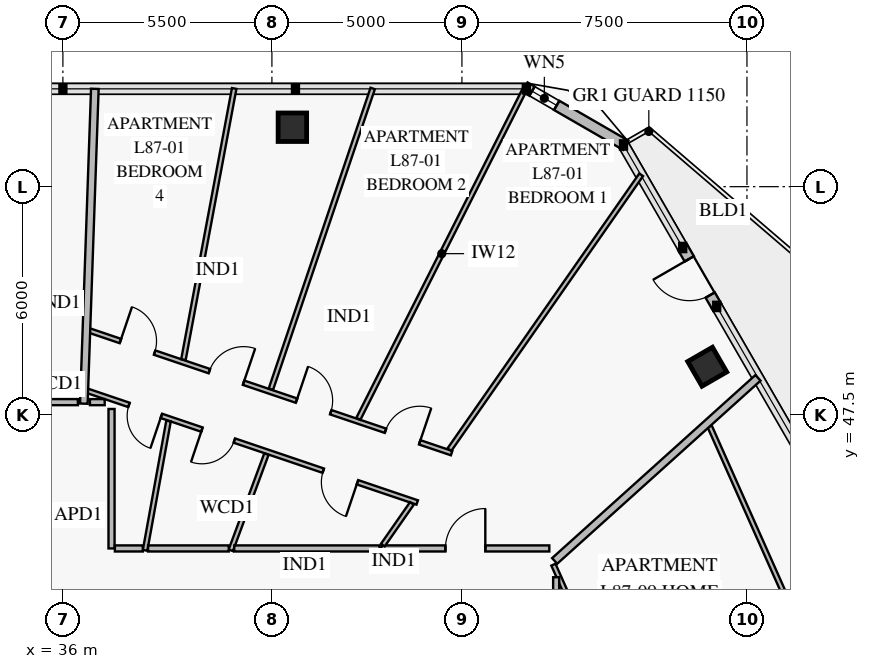
"""IFC4 building model, lengths in metres.
Left out: names, types, materials, properties, quantities, classifications, styles, units other than length and angle.
Written with IfcOpenShell. Run it as: python <this file> out.ifc"""

import sys

from ifc_helpers import new_model, si_unit, direction, frame, frame_2d, origin, origin_2d, place, context, subcontext, project, spatial, rectangle, extrude, element, fill, save


model = new_model("IFC4")
c1 = context("Model", 3, precision=1e-05, world=origin(), true_north=direction((0.0, 1.0)))
c2 = subcontext(c1, "Body", "Model", "MODEL_VIEW")
j1 = project(units=[si_unit("LENGTHUNIT", "METRE"), si_unit("PLANEANGLEUNIT", "RADIAN")], contexts=[c1])
p1 = place(None, origin())
s1 = spatial("IfcSite", under=j1, at=p1, CompositionType="ELEMENT")
p2 = place(p1, origin())
s2 = spatial("IfcBuilding", under=s1, at=p2, CompositionType="ELEMENT")
p3 = place(p2, frame((0.0, 0.0, 342.4)))
s3 = spatial("IfcBuildingStorey", under=s2, at=p3, CompositionType="ELEMENT", Elevation=342.4)
for number, where, z_axis, x_axis in (
    (1, (52.955, 48.762, 0.0), (0.0, 0.0, 1.0), (-0.5, 0.866, 0.0)),
    (2, (42.039, 55.064, 0.0), (0.0, 0.0, 1.0), (-1.0, 0.0, 0.0)),
):
    element("IfcColumn", number, at=place(p3, frame(where, z_axis=z_axis, x_axis=x_axis)), inside=s3, PredefinedType="COLUMN", context=c2, shape_type="SweptSolid", body=[
        extrude(rectangle(XDim=0.75, YDim=0.75, at=origin_2d()), origin(), (0.0, 0.0, 1.0), 3.55),
    ])
p4 = place(p3, frame((48.157, 56.122, 0.0), z_axis=(0.0, 0.0, 1.0), x_axis=(0.866023752521, -0.50000286006, 0.0)))
e3 = element("IfcWall", 3, at=p4, inside=s3, PredefinedType="SOLIDWALL", context=c2, shape_type="SweptSolid", body=[
    extrude(rectangle(XDim=3.065, YDim=0.28, at=frame_2d((1.532, 0.0))), origin(), (0.0, 0.0, 1.0), 3.55),
])
p5 = place(p4, frame((0.216, 0.0, 0.85)))
e4 = element("IfcOpeningElement", 4, at=p5, cuts=e3, PredefinedType="OPENING", context=c2, shape_type="SweptSolid", body=[
    extrude(rectangle(XDim=0.75, YDim=1.5, at=frame_2d((0.375, 0.75))), frame((0.0, 0.152, 0.0), z_axis=(0.0, -1.0, 0.0), x_axis=(1.0, 0.0, 0.0)), (0.0, 0.0, 1.0), 0.304),
])
p6 = place(p3, frame((52.31, 51.899, 0.0), z_axis=(0.0, 0.0, 1.0), x_axis=(0.500041240653, -0.866001592173, 0.0)))
e5 = element("IfcWall", 5, at=p6, inside=s3, PredefinedType="SOLIDWALL", context=c2, shape_type="SweptSolid", body=[
    extrude(rectangle(XDim=1.79, YDim=0.28, at=frame_2d((0.895, 0.0))), origin(), (0.0, 0.0, 1.0), 3.55),
])
p7 = place(p6, frame((0.345, 0.0, 0.0)))
e6 = element("IfcOpeningElement", 6, at=p7, cuts=e5, PredefinedType="OPENING", context=c2, shape_type="SweptSolid", body=[
    extrude(rectangle(XDim=1.1, YDim=2.2, at=frame_2d((0.55, 1.1))), frame((0.0, 0.152, 0.0), z_axis=(0.0, -1.0, 0.0), x_axis=(1.0, 0.0, 0.0)), (0.0, 0.0, 1.0), 0.304),
])
p8 = place(p3, frame((45.323, 45.19, 0.0), z_axis=(0.0, 0.0, 1.0), x_axis=(-0.947209030083, 0.320616676625, 0.0)))
e7 = element("IfcWall", 7, at=p8, inside=s3, PredefinedType="PARTITIONING", context=c2, shape_type="SweptSolid", body=[
    extrude(rectangle(XDim=9.205, YDim=0.12, at=frame_2d((4.602, 0.0))), origin(), (0.0, 0.0, 1.0), 3.0),
])
p9 = place(p8, frame((1.659, 0.0, 0.0)))
e8 = element("IfcOpeningElement", 8, at=p9, cuts=e7, PredefinedType="OPENING", context=c2, shape_type="SweptSolid", body=[
    extrude(rectangle(XDim=0.95, YDim=2.1, at=frame_2d((0.475, 1.05))), frame((0.0, 0.072, 0.0), z_axis=(0.0, -1.0, 0.0), x_axis=(1.0, 0.0, 0.0)), (0.0, 0.0, 1.0), 0.144),
])
p10 = place(p8, frame((5.08, 0.0, 0.0)))
e9 = element("IfcOpeningElement", 9, at=p10, cuts=e7, PredefinedType="OPENING", context=c2, shape_type="SweptSolid", body=[
    extrude(rectangle(XDim=0.9, YDim=2.1, at=frame_2d((0.45, 1.05))), frame((0.0, 0.072, 0.0), z_axis=(0.0, -1.0, 0.0), x_axis=(1.0, 0.0, 0.0)), (0.0, 0.0, 1.0), 0.144),
])
p11 = place(p8, frame((7.107, 0.0, 0.0)))
e10 = element("IfcOpeningElement", 10, at=p11, cuts=e7, PredefinedType="OPENING", context=c2, shape_type="SweptSolid", body=[
    extrude(rectangle(XDim=0.9, YDim=2.1, at=frame_2d((0.45, 1.05))), frame((0.0, 0.072, 0.0), z_axis=(0.0, -1.0, 0.0), x_axis=(1.0, 0.0, 0.0)), (0.0, 0.0, 1.0), 0.144),
])
p12 = place(p3, frame((46.229, 46.488, 0.0), z_axis=(0.0, 0.0, 1.0), x_axis=(-0.947206471438, 0.320624235618, 0.0)))
e11 = element("IfcWall", 11, at=p12, inside=s3, PredefinedType="PARTITIONING", context=c2, shape_type="SweptSolid", body=[
    extrude(rectangle(XDim=10.088, YDim=0.12, at=frame_2d((5.044, 0.0))), origin(), (0.0, 0.0, 1.0), 3.0),
])
p13 = place(p12, frame((0.887, 0.0, 0.0)))
e12 = element("IfcOpeningElement", 12, at=p13, cuts=e11, PredefinedType="OPENING", context=c2, shape_type="SweptSolid", body=[
    extrude(rectangle(XDim=0.95, YDim=2.1, at=frame_2d((0.475, 1.05))), frame((0.0, 0.072, 0.0), z_axis=(0.0, -1.0, 0.0), x_axis=(1.0, 0.0, 0.0)), (0.0, 0.0, 1.0), 0.144),
])
p14 = place(p12, frame((3.358, 0.0, 0.0)))
e13 = element("IfcOpeningElement", 13, at=p14, cuts=e11, PredefinedType="OPENING", context=c2, shape_type="SweptSolid", body=[
    extrude(rectangle(XDim=0.95, YDim=2.1, at=frame_2d((0.475, 1.05))), frame((0.0, 0.072, 0.0), z_axis=(0.0, -1.0, 0.0), x_axis=(1.0, 0.0, 0.0)), (0.0, 0.0, 1.0), 0.144),
])
p15 = place(p12, frame((5.779, 0.0, 0.0)))
e14 = element("IfcOpeningElement", 14, at=p15, cuts=e11, PredefinedType="OPENING", context=c2, shape_type="SweptSolid", body=[
    extrude(rectangle(XDim=0.95, YDim=2.1, at=frame_2d((0.475, 1.05))), frame((0.0, 0.072, 0.0), z_axis=(0.0, -1.0, 0.0), x_axis=(1.0, 0.0, 0.0)), (0.0, 0.0, 1.0), 0.144),
])
p16 = place(p12, frame((8.251, 0.0, 0.0)))
e15 = element("IfcOpeningElement", 15, at=p16, cuts=e11, PredefinedType="OPENING", context=c2, shape_type="SweptSolid", body=[
    extrude(rectangle(XDim=0.95, YDim=2.1, at=frame_2d((0.475, 1.05))), frame((0.0, 0.072, 0.0), z_axis=(0.0, -1.0, 0.0), x_axis=(1.0, 0.0, 0.0)), (0.0, 0.0, 1.0), 0.144),
])
p17 = place(p3, frame((48.799, 43.98, 0.0), z_axis=(0.0, 0.0, 1.0), x_axis=(-1.0, 0.0, 0.0)))
e16 = element("IfcWall", 16, at=p17, inside=s3, PredefinedType="PARTITIONING", context=c2, shape_type="SweptSolid", body=[
    extrude(rectangle(XDim=4.418, YDim=0.16, at=frame_2d((2.209, 0.0))), origin(), (0.0, 0.0, 1.0), 3.0),
])
p18 = place(p17, frame((1.684, 0.0, 0.0)))
e17 = element("IfcOpeningElement", 17, at=p18, cuts=e16, PredefinedType="OPENING", context=c2, shape_type="SweptSolid", body=[
    extrude(rectangle(XDim=1.05, YDim=2.15, at=frame_2d((0.525, 1.075))), frame((0.0, 0.092, 0.0), z_axis=(0.0, -1.0, 0.0), x_axis=(1.0, 0.0, 0.0)), (0.0, 0.0, 1.0), 0.184),
])
p19 = place(p3, frame((56.469, 39.442, 0.0), z_axis=(0.0, 0.0, 1.0), x_axis=(-0.406736554193, 0.913545497216, 0.0)))
e18 = element("IfcWall", 18, at=p19, inside=s3, PredefinedType="PARTITIONING", context=c2, shape_type="SweptSolid", body=[
    extrude(rectangle(XDim=8.483, YDim=0.12, at=frame_2d((4.241, 0.0))), origin(), (0.0, 0.0, 1.0), 3.55),
])
p20 = place(p19, frame((2.362, 0.0, 0.0)))
e19 = element("IfcOpeningElement", 19, at=p20, cuts=e18, PredefinedType="OPENING", context=c2, shape_type="SweptSolid", body=[
    extrude(rectangle(XDim=0.95, YDim=2.1, at=frame_2d((0.475, 1.05))), frame((0.0, 0.072, 0.0), z_axis=(0.0, -1.0, 0.0), x_axis=(1.0, 0.0, 0.0)), (0.0, 0.0, 1.0), 0.144),
])
p21 = place(p3, frame((48.94, 43.651, 0.0), z_axis=(0.0, 0.0, 1.0), x_axis=(0.74315080538, 0.669123964944, 0.0)))
e20 = element("IfcWall", 20, at=p21, inside=s3, PredefinedType="PARTITIONING", context=c2, shape_type="SweptSolid", body=[
    extrude(rectangle(XDim=7.199, YDim=0.2, at=frame_2d((3.6, 0.0))), origin(), (0.0, 0.0, 1.0), 2.97),
])
p22 = place(p3, frame((40.418, 43.93, 0.0), z_axis=(0.0, 0.0, 1.0), x_axis=(0.347234815936, 0.937778216105, 0.0)))
e21 = element("IfcWall", 21, at=p22, inside=s3, PredefinedType="PARTITIONING", context=c2, shape_type="SweptSolid", body=[
    extrude(rectangle(XDim=2.699, YDim=0.12, at=frame_2d((1.35, 0.0))), origin(), (0.0, 0.0, 1.0), 3.55),
])
p23 = place(p3, frame((38.163, 43.93, 0.0), z_axis=(0.0, 0.0, 1.0), x_axis=(0.178394636556, 0.983959020309, 0.0)))
e22 = element("IfcWall", 22, at=p23, inside=s3, PredefinedType="PARTITIONING", context=c2, shape_type="SweptSolid", body=[
    extrude(rectangle(XDim=3.458, YDim=0.12, at=frame_2d((1.729, 0.0))), origin(), (0.0, 0.0, 1.0), 3.55),
])
p24 = place(p3, frame((43.774, 47.39, 0.0), z_axis=(0.0, 0.0, 1.0), x_axis=(0.450869548037, 0.892589855787, 0.0)))
e23 = element("IfcWall", 23, at=p24, inside=s3, PredefinedType="PARTITIONING", context=c2, shape_type="SweptSolid", body=[
    extrude(rectangle(XDim=9.74, YDim=0.12, at=frame_2d((4.87, 0.0))), origin(), (0.0, 0.0, 1.0), 2.97),
])
p25 = place(p3, frame((41.473, 48.169, 0.0), z_axis=(0.0, 0.0, 1.0), x_axis=(0.32064215142, 0.947200406848, 0.0)))
e24 = element("IfcWall", 24, at=p25, inside=s3, PredefinedType="PARTITIONING", context=c2, shape_type="SweptSolid", body=[
    extrude(rectangle(XDim=8.356, YDim=0.12, at=frame_2d((4.178, 0.0))), origin(), (0.0, 0.0, 1.0), 2.97),
])
p26 = place(p3, frame((39.172, 48.948, 0.0), z_axis=(0.0, 0.0, 1.0), x_axis=(0.183929112918, 0.982939510561, 0.0)))
e25 = element("IfcWall", 25, at=p26, inside=s3, PredefinedType="PARTITIONING", context=c2, shape_type="SweptSolid", body=[
    extrude(rectangle(XDim=7.259, YDim=0.12, at=frame_2d((3.63, 0.0))), origin(), (0.0, 0.0, 1.0), 2.97),
])
p27 = place(p3, frame((44.419, 44.068, 0.0), z_axis=(0.0, 0.0, 1.0), x_axis=(0.572224421866, 0.820097074144, 0.0)))
e26 = element("IfcWall", 26, at=p27, inside=s3, PredefinedType="PARTITIONING", context=c2, shape_type="SweptSolid", body=[
    extrude(rectangle(XDim=1.338, YDim=0.12, at=frame_2d((0.669, 0.0))), origin(), (0.0, 0.0, 1.0), 3.55),
])
p28 = place(p3, frame((46.171, 46.579, 0.0), z_axis=(0.0, 0.0, 1.0), x_axis=(0.572144356321, 0.820152934233, 0.0)))
e27 = element("IfcWall", 27, at=p28, inside=s3, PredefinedType="PARTITIONING", context=c2, shape_type="SweptSolid", body=[
    extrude(rectangle(XDim=8.819, YDim=0.12, at=frame_2d((4.41, 0.0))), origin(), (0.0, 0.0, 1.0), 2.97),
])
p29 = place(p3, frame((36.552, 47.79, 0.0), z_axis=(0.0, 0.0, 1.0), x_axis=(0.034901510276, 0.999390756702, 0.0)))
e28 = element("IfcWall", 28, at=p29, inside=s3, PredefinedType="PARTITIONING", context=c2, shape_type="SweptSolid", body=[
    extrude(rectangle(XDim=8.289, YDim=0.2, at=frame_2d((4.145, 0.0))), origin(), (0.0, 0.0, 1.0), 2.97),
])
p30 = place(p3, frame((51.53, 37.663, 0.0), z_axis=(0.0, 0.0, 1.0), x_axis=(-0.406732154443, 0.913547456097, 0.0)))
e29 = element("IfcWall", 29, at=p30, inside=s3, PredefinedType="PARTITIONING", context=c2, shape_type="SweptSolid", body=[
    extrude(rectangle(XDim=6.447, YDim=0.12, at=frame_2d((3.224, 0.0))), origin(), (0.0, 0.0, 1.0), 3.55),
])
p31 = place(p3, frame((44.333, 43.98, 0.0), z_axis=(0.0, 0.0, 1.0), x_axis=(-1.0, 0.0, 0.0)))
e30 = element("IfcWall", 30, at=p31, inside=s3, PredefinedType="PARTITIONING", context=c2, shape_type="SweptSolid", body=[
    extrude(rectangle(XDim=3.824, YDim=0.16, at=frame_2d((1.912, 0.0))), origin(), (0.0, 0.0, 1.0), 3.55),
])
p32 = place(p3, frame((40.364, 43.98, 0.0), z_axis=(0.0, 0.0, 1.0), x_axis=(-1.0, 0.0, 0.0)))
e31 = element("IfcWall", 31, at=p32, inside=s3, PredefinedType="PARTITIONING", context=c2, shape_type="SweptSolid", body=[
    extrude(rectangle(XDim=2.123, YDim=0.16, at=frame_2d((1.061, 0.0))), origin(), (0.0, 0.0, 1.0), 3.0),
])
p33 = place(p3, frame((37.28, 43.98, 0.0), z_axis=(0.0, 0.0, 1.0), x_axis=(0.0, 1.0, 0.0)))
e32 = element("IfcWall", 32, at=p33, inside=s3, PredefinedType="PARTITIONING", context=c2, shape_type="SweptSolid", body=[
    extrude(rectangle(XDim=3.67, YDim=0.16, at=frame_2d((1.835, 0.0))), origin(), (0.0, 0.0, 1.0), 3.55),
])
p34 = place(p3, frame((38.103, 43.98, 0.0), z_axis=(0.0, 0.0, 1.0), x_axis=(-1.0, 0.0, 0.0)))
e33 = element("IfcWall", 33, at=p34, inside=s3, PredefinedType="PARTITIONING", context=c2, shape_type="SweptSolid", body=[
    extrude(rectangle(XDim=0.735, YDim=0.16, at=frame_2d((0.367, 0.0))), origin(), (0.0, 0.0, 1.0), 3.55),
])
p35 = place(p3, frame((37.1, 47.83, 0.0), z_axis=(0.0, 0.0, 1.0), x_axis=(-1.0, 0.0, 0.0)))
e34 = element("IfcWall", 34, at=p35, inside=s3, PredefinedType="PARTITIONING", context=c2, shape_type="SweptSolid", body=[
    extrude(rectangle(XDim=0.389, YDim=0.16, at=frame_2d((0.194, 0.0))), origin(), (0.0, 0.0, 1.0), 3.55),
])
p36 = place(p3, frame((36.395, 47.83, 0.0), z_axis=(0.0, 0.0, 1.0), x_axis=(-1.0, 0.0, 0.0)))
e35 = element("IfcWall", 35, at=p36, inside=s3, PredefinedType="PARTITIONING", context=c2, shape_type="SweptSolid", body=[
    extrude(rectangle(XDim=1.495, YDim=0.16, at=frame_2d((0.747, 0.0))), origin(), (0.0, 0.0, 1.0), 3.55),
])
p37 = place(p3, frame((48.98, 36.745, 0.0), z_axis=(0.0, 0.0, 1.0), x_axis=(0.0, 1.0, 0.0)))
e36 = element("IfcWall", 36, at=p37, inside=s3, PredefinedType="PARTITIONING", context=c2, shape_type="SweptSolid", body=[
    extrude(rectangle(XDim=6.477, YDim=0.16, at=frame_2d((3.238, 0.0))), origin(), (0.0, 0.0, 1.0), 3.55),
])
p38 = place(p5, origin())
e37 = element("IfcWindow", 37, at=p38, inside=s3, PartitioningType="SINGLE_PANEL", PredefinedType="WINDOW", context=c2, shape_type="SweptSolid", body=[
    extrude(rectangle(XDim=0.75, YDim=1.5, at=frame_2d((0.375, 0.75))), frame((0.0, 0.03, 0.0), z_axis=(0.0, -1.0, 0.0), x_axis=(1.0, 0.0, 0.0)), (0.0, 0.0, 1.0), 0.06),
])
fill(e4, e37)
p39 = place(p7, frame((1.1, 0.0, 0.0), z_axis=(0.0, 0.0, 1.0), x_axis=(-1.0, 0.0, 0.0)))
e38 = element("IfcDoor", 38, at=p39, inside=s3, OperationType="SINGLE_SWING_RIGHT", PredefinedType="DOOR", context=c2, shape_type="SweptSolid", body=[
    extrude(rectangle(XDim=1.1, YDim=2.2, at=frame_2d((0.55, 1.1))), frame((0.0, 0.025, 0.0), z_axis=(0.0, -1.0, 0.0), x_axis=(1.0, 0.0, 0.0)), (0.0, 0.0, 1.0), 0.05),
])
fill(e6, e38)
p40 = place(p9, origin())
e39 = element("IfcDoor", 39, at=p40, inside=s3, OperationType="SINGLE_SWING_LEFT", PredefinedType="DOOR", context=c2, shape_type="SweptSolid", body=[
    extrude(rectangle(XDim=0.95, YDim=2.1, at=frame_2d((0.475, 1.05))), frame((0.0, 0.025, 0.0), z_axis=(0.0, -1.0, 0.0), x_axis=(1.0, 0.0, 0.0)), (0.0, 0.0, 1.0), 0.05),
])
fill(e8, e39)
p41 = place(p10, origin())
e40 = element("IfcDoor", 40, at=p41, inside=s3, OperationType="SINGLE_SWING_RIGHT", PredefinedType="DOOR", context=c2, shape_type="SweptSolid", body=[
    extrude(rectangle(XDim=0.9, YDim=2.1, at=frame_2d((0.45, 1.05))), frame((0.0, 0.025, 0.0), z_axis=(0.0, -1.0, 0.0), x_axis=(1.0, 0.0, 0.0)), (0.0, 0.0, 1.0), 0.05),
])
fill(e9, e40)
p42 = place(p11, origin())
e41 = element("IfcDoor", 41, at=p42, inside=s3, OperationType="SINGLE_SWING_LEFT", PredefinedType="DOOR", context=c2, shape_type="SweptSolid", body=[
    extrude(rectangle(XDim=0.9, YDim=2.1, at=frame_2d((0.45, 1.05))), frame((0.0, 0.025, 0.0), z_axis=(0.0, -1.0, 0.0), x_axis=(1.0, 0.0, 0.0)), (0.0, 0.0, 1.0), 0.05),
])
fill(e10, e41)
p43 = place(p13, frame((0.95, 0.0, 0.0), z_axis=(0.0, 0.0, 1.0), x_axis=(-1.0, 0.0, 0.0)))
e42 = element("IfcDoor", 42, at=p43, inside=s3, OperationType="SINGLE_SWING_RIGHT", PredefinedType="DOOR", context=c2, shape_type="SweptSolid", body=[
    extrude(rectangle(XDim=0.95, YDim=2.1, at=frame_2d((0.475, 1.05))), frame((0.0, 0.025, 0.0), z_axis=(0.0, -1.0, 0.0), x_axis=(1.0, 0.0, 0.0)), (0.0, 0.0, 1.0), 0.05),
])
fill(e12, e42)
p44 = place(p14, frame((0.95, 0.0, 0.0), z_axis=(0.0, 0.0, 1.0), x_axis=(-1.0, 0.0, 0.0)))
e43 = element("IfcDoor", 43, at=p44, inside=s3, OperationType="SINGLE_SWING_LEFT", PredefinedType="DOOR", context=c2, shape_type="SweptSolid", body=[
    extrude(rectangle(XDim=0.95, YDim=2.1, at=frame_2d((0.475, 1.05))), frame((0.0, 0.025, 0.0), z_axis=(0.0, -1.0, 0.0), x_axis=(1.0, 0.0, 0.0)), (0.0, 0.0, 1.0), 0.05),
])
fill(e13, e43)
p45 = place(p15, frame((0.95, 0.0, 0.0), z_axis=(0.0, 0.0, 1.0), x_axis=(-1.0, 0.0, 0.0)))
e44 = element("IfcDoor", 44, at=p45, inside=s3, OperationType="SINGLE_SWING_RIGHT", PredefinedType="DOOR", context=c2, shape_type="SweptSolid", body=[
    extrude(rectangle(XDim=0.95, YDim=2.1, at=frame_2d((0.475, 1.05))), frame((0.0, 0.025, 0.0), z_axis=(0.0, -1.0, 0.0), x_axis=(1.0, 0.0, 0.0)), (0.0, 0.0, 1.0), 0.05),
])
fill(e14, e44)
p46 = place(p16, frame((0.95, 0.0, 0.0), z_axis=(0.0, 0.0, 1.0), x_axis=(-1.0, 0.0, 0.0)))
e45 = element("IfcDoor", 45, at=p46, inside=s3, OperationType="SINGLE_SWING_LEFT", PredefinedType="DOOR", context=c2, shape_type="SweptSolid", body=[
    extrude(rectangle(XDim=0.95, YDim=2.1, at=frame_2d((0.475, 1.05))), frame((0.0, 0.025, 0.0), z_axis=(0.0, -1.0, 0.0), x_axis=(1.0, 0.0, 0.0)), (0.0, 0.0, 1.0), 0.05),
])
fill(e15, e45)
p47 = place(p18, frame((1.05, 0.0, 0.0), z_axis=(0.0, 0.0, 1.0), x_axis=(-1.0, 0.0, 0.0)))
e46 = element("IfcDoor", 46, at=p47, inside=s3, OperationType="SINGLE_SWING_RIGHT", PredefinedType="DOOR", context=c2, shape_type="SweptSolid", body=[
    extrude(rectangle(XDim=1.05, YDim=2.15, at=frame_2d((0.525, 1.075))), frame((0.0, 0.025, 0.0), z_axis=(0.0, -1.0, 0.0), x_axis=(1.0, 0.0, 0.0)), (0.0, 0.0, 1.0), 0.05),
])
fill(e17, e46)
save(model, sys.argv[1])
